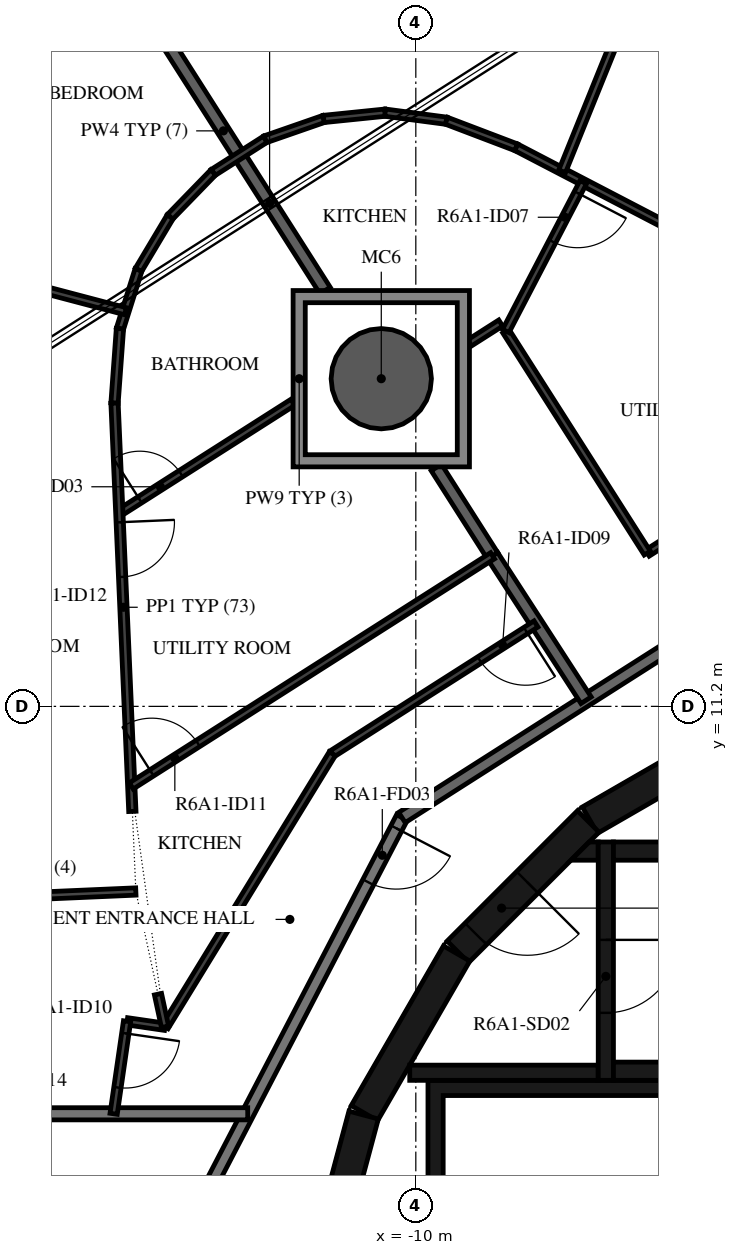
"""IFC4 building model, lengths in metres.
Left out: names, types, materials, properties, quantities, classifications, styles, units other than length and angle.
Written with IfcOpenShell. Run it as: python <this file> out.ifc"""

import sys

from ifc_helpers import new_model, si_unit, direction, frame, frame_2d, origin, origin_2d, place, context, subcontext, project, spatial, polyline, rectangle, hollow_circle, outline, extrude, element, fill, save


model = new_model("IFC4")
c1 = context("Model", 3, precision=1e-05, world=origin(), true_north=direction((0.0, 1.0)))
c2 = subcontext(c1, "Body", "Model", "MODEL_VIEW")
j1 = project(units=[si_unit("LENGTHUNIT", "METRE"), si_unit("PLANEANGLEUNIT", "RADIAN")], contexts=[c1])
p1 = place(None, origin())
s1 = spatial("IfcSite", under=j1, at=p1, CompositionType="ELEMENT")
p2 = place(p1, origin())
s2 = spatial("IfcBuilding", under=s1, at=p2, CompositionType="ELEMENT")
p3 = place(p2, frame((0.0, 0.0, 230.2)))
s3 = spatial("IfcBuildingStorey", under=s2, at=p3, CompositionType="ELEMENT", Elevation=230.2)
p4 = place(p3, frame((-10.568, 16.588, -0.38), z_axis=(0.0, 0.0, 1.0), x_axis=(1.0, 0.0, 0.0)))
e1 = element("IfcColumn", 1, at=p4, inside=s3, PredefinedType="COLUMN", context=c2, shape_type="SweptSolid", body=[
    extrude(hollow_circle(Radius=0.825, WallThickness=0.04, at=origin_2d()), origin(), (0.0, 0.0, 1.0), 3.5),
])
p5 = place(p3, frame((-4.51, 10.845, 0.0), z_axis=(0.0, 0.0, 1.0), x_axis=(-0.865975092491, -0.500087131594, 0.0)))
e2 = element("IfcWall", 2, at=p5, inside=s3, PredefinedType="SHEAR", context=c2, shape_type="SweptSolid", body=[
    extrude(rectangle(XDim=3.033, YDim=0.5, at=frame_2d((1.516, 0.0))), origin(), (0.0, 0.0, 1.0), 3.12),
])
p6 = place(p3, frame((-7.164, 9.308, 0.0), z_axis=(0.0, 0.0, 1.0), x_axis=(-0.707106781187, -0.707106781187, 0.0)))
e3 = element("IfcWall", 3, at=p6, inside=s3, PredefinedType="SHEAR", context=c2, shape_type="SweptSolid", body=[
    extrude(rectangle(XDim=3.032, YDim=0.5, at=frame_2d((1.516, 0.0))), origin(), (0.0, 0.0, 1.0), 3.12),
])
p7 = place(p6, frame((1.416, 0.0, 0.0)))
e4 = element("IfcOpeningElement", 4, at=p7, cuts=e3, PredefinedType="OPENING", context=c2, shape_type="SweptSolid", body=[
    extrude(rectangle(XDim=1.2, YDim=2.1, at=frame_2d((0.6, 1.05))), frame((0.0, 0.26, 0.0), z_axis=(0.0, -1.0, 0.0), x_axis=(1.0, 0.0, 0.0)), (0.0, 0.0, 1.0), 0.52),
])
for number, where, z_axis, x_axis in (
    (5, (-9.329, 7.137, 0.0), (0.0, 0.0, 1.0), (-0.5, -0.866, 0.0)),
    (6, (-10.858, 4.479, 0.0), (0.0, 0.0, 1.0), (-0.259, -0.966, 0.0)),
):
    element("IfcWall", number, at=place(p3, frame(where, z_axis=z_axis, x_axis=x_axis)), inside=s3, PredefinedType="SHEAR", context=c2, shape_type="SweptSolid", body=[
        extrude(rectangle(XDim=3.033, YDim=0.5, at=frame_2d((1.516, 0.0))), origin(), (0.0, 0.0, 1.0), 3.12),
    ])
for number, where, z_axis, x_axis in (
    (7, (-6.75, 5.2, 0.0), (0.0, 0.0, 1.0), (1.0, 0.0, 0.0)),
    (8, (-6.75, 8.82, 0.0), (0.0, 0.0, 1.0), (1.0, 0.0, 0.0)),
):
    element("IfcWall", number, at=place(p3, frame(where, z_axis=z_axis, x_axis=x_axis)), inside=s3, PredefinedType="SHEAR", context=c2, shape_type="SweptSolid", body=[
        extrude(rectangle(XDim=6.75, YDim=0.3, at=frame_2d((3.375, 0.0))), origin(), (0.0, 0.0, 1.0), 3.12),
    ])
p8 = place(p3, frame((-6.875, 8.97, 0.0), z_axis=(0.0, 0.0, 1.0), x_axis=(0.0, -1.0, 0.0)))
e9 = element("IfcWall", 9, at=p8, inside=s3, PredefinedType="SHEAR", context=c2, shape_type="SweptSolid", body=[
    extrude(rectangle(XDim=3.92, YDim=0.25, at=frame_2d((1.96, 0.0))), origin(), (0.0, 0.0, 1.0), 3.12),
])
p9 = place(p8, frame((1.61, 0.0, 0.0)))
e10 = element("IfcOpeningElement", 10, at=p9, cuts=e9, PredefinedType="OPENING", context=c2, shape_type="SweptSolid", body=[
    extrude(rectangle(XDim=1.2, YDim=2.1, at=frame_2d((0.6, 1.05))), frame((0.0, 0.135, 0.0), z_axis=(0.0, -1.0, 0.0), x_axis=(1.0, 0.0, 0.0)), (0.0, 0.0, 1.0), 0.27),
])
p10 = place(p3, frame((-7.0, 5.175, 0.0), z_axis=(0.0, 0.0, 1.0), x_axis=(-1.0, 0.0, 0.0)))
e11 = element("IfcWall", 11, at=p10, inside=s3, PredefinedType="SHEAR", context=c2, shape_type="SweptSolid", body=[
    extrude(rectangle(XDim=3.1, YDim=0.25, at=frame_2d((1.55, 0.0))), origin(), (0.0, 0.0, 1.0), 3.12),
])
p11 = place(p3, origin())
e12 = element("IfcWall", 12, at=p11, inside=s3, PredefinedType="SHEAR", context=c2, shape_type="SweptSolid", body=[
    extrude(outline(polyline([(-7.148, 8.97), (-7.0, 8.97), (-7.0, 8.67), (-7.448, 8.67), (-7.148, 8.97)])), origin(), (0.0, 0.0, 1.0), 3.12),
])
p12 = place(p3, origin())
e13 = element("IfcWall", 13, at=p12, inside=s3, PredefinedType="SHEAR", context=c2, shape_type="SweptSolid", body=[
    extrude(outline(polyline([(-9.55, 4.8), (-5.5, 4.8), (-5.5, 1.9), (-5.25, 1.9), (-5.25, 4.8), (-1.2, 4.8), (-1.2, 1.9), (-0.95, 1.9), (-0.95, 4.8), (0.95, 4.8), (0.95, 1.9), (1.2, 1.9), (1.2, 4.8), (3.1, 4.8), (3.1, 1.9), (3.35, 1.9), (3.35, 4.8), (5.25, 4.8), (5.25, 1.9), (5.5, 1.9), (5.5, 4.8), (7.4, 4.8), (7.4, 1.9), (7.65, 1.9), (7.65, 4.8), (9.55, 4.8), (9.55, 1.9), (9.8, 1.9), (9.8, 4.8), (9.8, 5.05), (-9.8, 5.05), (-9.8, 4.8), (-9.8, 1.9), (-9.55, 1.9), (-9.55, 4.8)])), origin(), (0.0, 0.0, 1.0), 3.12),
])
p13 = place(p3, frame((-10.228, 9.372, 0.0), z_axis=(0.0, 0.0, 1.0), x_axis=(-0.461759464021, -0.887005184532, 0.0)))
e14 = element("IfcWall", 14, at=p13, inside=s3, PredefinedType="STANDARD", context=c2, shape_type="SweptSolid", body=[
    extrude(rectangle(XDim=7.181, YDim=0.2, at=frame_2d((3.591, 0.0))), origin(), (0.0, 0.0, 1.0), 3.12),
])
p14 = place(p13, frame((0.2, 0.0, 0.0)))
e15 = element("IfcOpeningElement", 15, at=p14, cuts=e14, PredefinedType="OPENING", context=c2, shape_type="SweptSolid", body=[
    extrude(rectangle(XDim=1.0, YDim=2.1, at=frame_2d((0.5, 1.05))), frame((0.0, 0.11, 0.0), z_axis=(0.0, -1.0, 0.0), x_axis=(1.0, 0.0, 0.0)), (0.0, 0.0, 1.0), 0.22),
])
p15 = place(p3, frame((-4.172, 13.231, 0.0), z_axis=(0.0, 0.0, 1.0), x_axis=(-0.843388394728, -0.537304397561, 0.0)))
e16 = element("IfcWall", 16, at=p15, inside=s3, PredefinedType="STANDARD", context=c2, shape_type="SweptSolid", body=[
    extrude(rectangle(XDim=7.181, YDim=0.2, at=frame_2d((3.59, 0.0))), origin(), (0.0, 0.0, 1.0), 3.12),
])
p16 = place(p3, frame((-12.764, 4.5, 0.0), z_axis=(0.0, 0.0, 1.0), x_axis=(-1.0, 0.0, 0.0)))
e17 = element("IfcWall", 17, at=p16, inside=s3, PredefinedType="STANDARD", context=c2, shape_type="SweptSolid", body=[
    extrude(rectangle(XDim=4.086, YDim=0.2, at=frame_2d((2.043, 0.0))), origin(), (0.0, 0.0, 1.0), 3.12),
])
p17 = place(p3, frame((-8.738, 13.677, 0.0), z_axis=(0.0, 0.0, 1.0), x_axis=(0.54358037296, -0.839357121929, 0.0)))
e18 = element("IfcWall", 18, at=p17, inside=s3, PredefinedType="STANDARD", context=c2, shape_type="SweptSolid", body=[
    extrude(rectangle(XDim=2.83, YDim=0.2, at=frame_2d((1.415, 0.0))), origin(), (0.0, 0.0, 1.0), 3.12),
])
p18 = place(p3, frame((-9.663, 15.129, 0.0), z_axis=(0.0, 0.0, 1.0), x_axis=(0.537205715853, -0.843451254581, 0.0)))
e19 = element("IfcWall", 19, at=p18, inside=s3, PredefinedType="STANDARD", context=c2, shape_type="SweptSolid", body=[
    extrude(rectangle(XDim=1.722, YDim=0.2, at=frame_2d((0.861, 0.0))), origin(), (0.0, 0.0, 1.0), 3.12),
])
p19 = place(p3, frame((-14.837, 23.29, 0.0), z_axis=(0.0, 0.0, 1.0), x_axis=(0.537316863221, -0.843380452998, 0.0)))
e20 = element("IfcWall", 20, at=p19, inside=s3, PredefinedType="STANDARD", context=c2, shape_type="SweptSolid", body=[
    extrude(rectangle(XDim=6.227, YDim=0.2, at=frame_2d((3.113, 0.0))), origin(), (0.0, 0.0, 1.0), 3.12),
])
p20 = place(p3, frame((-4.639, 14.712, 0.0), z_axis=(0.0, 0.0, 1.0), x_axis=(-0.843361471414, -0.537346655833, 0.0)))
e21 = element("IfcWall", 21, at=p20, inside=s3, PredefinedType="PARTITIONING", context=c2, shape_type="SweptSolid", body=[
    extrude(rectangle(XDim=1.844, YDim=0.12, at=frame_2d((0.922, 0.0))), origin(), (0.0, 0.0, 1.0), 3.12),
])
p21 = place(p20, frame((0.2, 0.0, 0.0)))
e22 = element("IfcOpeningElement", 22, at=p21, cuts=e21, PredefinedType="OPENING", context=c2, shape_type="SweptSolid", body=[
    extrude(rectangle(XDim=0.9, YDim=2.1, at=frame_2d((0.45, 1.05))), frame((0.0, 0.07, 0.0), z_axis=(0.0, -1.0, 0.0), x_axis=(1.0, 0.0, 0.0)), (0.0, 0.0, 1.0), 0.14),
])
p22 = place(p3, frame((-6.194, 13.721, 0.0), z_axis=(0.0, 0.0, 1.0), x_axis=(-0.537316807294, 0.843380488629, 0.0)))
e23 = element("IfcWall", 23, at=p22, inside=s3, PredefinedType="PARTITIONING", context=c2, shape_type="SweptSolid", body=[
    extrude(rectangle(XDim=4.331, YDim=0.12, at=frame_2d((2.165, 0.0))), origin(), (0.0, 0.0, 1.0), 3.12),
])
p23 = place(p3, frame((-8.604, 17.504, 0.0), z_axis=(0.0, 0.0, 1.0), x_axis=(-0.843265746233, -0.537496866251, 0.0)))
e24 = element("IfcWall", 24, at=p23, inside=s3, PredefinedType="PARTITIONING", context=c2, shape_type="SweptSolid", body=[
    extrude(rectangle(XDim=0.61, YDim=0.12, at=frame_2d((0.305, 0.0))), origin(), (0.0, 0.0, 1.0), 3.12),
])
p24 = place(p3, frame((-8.35, 20.394, 0.0), z_axis=(0.0, 0.0, 1.0), x_axis=(0.887020940825, -0.461729196107, 0.0)))
e25 = element("IfcWall", 25, at=p24, inside=s3, PredefinedType="PARTITIONING", context=c2, shape_type="SweptSolid", body=[
    extrude(rectangle(XDim=11.678, YDim=0.12, at=frame_2d((5.839, 0.0))), origin(), (0.0, 0.0, 1.0), 3.12),
])
p25 = place(p3, frame((-6.237, 23.353, 0.0), z_axis=(0.0, 0.0, 1.0), x_axis=(-0.375089171101, -0.92698873441, 0.0)))
e26 = element("IfcWall", 26, at=p25, inside=s3, PredefinedType="PARTITIONING", context=c2, shape_type="SweptSolid", body=[
    extrude(rectangle(XDim=3.616, YDim=0.12, at=frame_2d((1.808, 0.0))), origin(), (0.0, 0.0, 1.0), 2.73),
])
p26 = place(p25, frame((0.2, 0.0, 0.0)))
e27 = element("IfcOpeningElement", 27, at=p26, cuts=e26, PredefinedType="OPENING", context=c2, shape_type="SweptSolid", body=[
    extrude(rectangle(XDim=0.9, YDim=2.1, at=frame_2d((0.45, 1.05))), frame((0.0, 0.07, 0.0), z_axis=(0.0, -1.0, 0.0), x_axis=(1.0, 0.0, 0.0)), (0.0, 0.0, 1.0), 0.14),
])
p27 = place(p3, frame((-7.247, 19.82, 0.0), z_axis=(0.0, 0.0, 1.0), x_axis=(-0.46174004932, -0.887015291218, 0.0)))
e28 = element("IfcWall", 28, at=p27, inside=s3, PredefinedType="PARTITIONING", context=c2, shape_type="SweptSolid", body=[
    extrude(rectangle(XDim=2.759, YDim=0.12, at=frame_2d((1.379, 0.0))), origin(), (0.0, 0.0, 1.0), 3.12),
])
p28 = place(p27, frame((0.2, 0.0, 0.0)))
e29 = element("IfcOpeningElement", 29, at=p28, cuts=e28, PredefinedType="OPENING", context=c2, shape_type="SweptSolid", body=[
    extrude(rectangle(XDim=0.9, YDim=2.1, at=frame_2d((0.45, 1.05))), frame((0.0, 0.07, 0.0), z_axis=(0.0, -1.0, 0.0), x_axis=(1.0, 0.0, 0.0)), (0.0, 0.0, 1.0), 0.14),
])
for number, where, z_axis, x_axis in (
    (30, (-13.332, 19.981, 0.0), (0.0, 0.0, 1.0), (0.843, 0.537, 0.0)),
    (31, (-12.475, 20.527, 0.0), (0.0, 0.0, 1.0), (0.945, 0.328, 0.0)),
):
    element("IfcWall", number, at=place(p3, frame(where, z_axis=z_axis, x_axis=x_axis)), inside=s3, PredefinedType="PARTITIONING", context=c2, shape_type="SweptSolid", body=[
        extrude(rectangle(XDim=1.016, YDim=0.12, at=frame_2d((0.508, 0.0))), origin(), (0.0, 0.0, 1.0), 3.12),
    ])
p29 = place(p3, frame((-11.515, 20.86, 0.0), z_axis=(0.0, 0.0, 1.0), x_axis=(0.994818278641, 0.101669034034, 0.0)))
e32 = element("IfcWall", 32, at=p29, inside=s3, PredefinedType="PARTITIONING", context=c2, shape_type="SweptSolid", body=[
    extrude(rectangle(XDim=1.016, YDim=0.12, at=frame_2d((0.508, 0.0))), origin(), (0.0, 0.0, 1.0), 3.12),
])
p30 = place(p3, frame((-10.504, 20.963, 0.0), z_axis=(0.0, 0.0, 1.0), x_axis=(0.991451023706, -0.13047937612, 0.0)))
e33 = element("IfcWall", 33, at=p30, inside=s3, PredefinedType="PARTITIONING", context=c2, shape_type="SweptSolid", body=[
    extrude(rectangle(XDim=1.016, YDim=0.12, at=frame_2d((0.508, 0.0))), origin(), (0.0, 0.0, 1.0), 3.12),
])
p31 = place(p3, frame((-9.497, 20.831, 0.0), z_axis=(0.0, 0.0, 1.0), x_axis=(0.934575963521, -0.355763641213, 0.0)))
e34 = element("IfcWall", 34, at=p31, inside=s3, PredefinedType="PARTITIONING", context=c2, shape_type="SweptSolid", body=[
    extrude(rectangle(XDim=1.227, YDim=0.12, at=frame_2d((0.614, 0.0))), origin(), (0.0, 0.0, 1.0), 3.12),
])
p32 = place(p3, frame((-8.023, 12.555, 0.0), z_axis=(0.0, 0.0, 1.0), x_axis=(-0.843408270233, -0.537273198385, 0.0)))
e35 = element("IfcWall", 35, at=p32, inside=s3, PredefinedType="PARTITIONING", context=c2, shape_type="SweptSolid", body=[
    extrude(rectangle(XDim=3.971, YDim=0.12, at=frame_2d((1.986, 0.0))), origin(), (0.0, 0.0, 1.0), 3.12),
])
p33 = place(p32, frame((0.2, 0.0, 0.0)))
e36 = element("IfcOpeningElement", 36, at=p33, cuts=e35, PredefinedType="OPENING", context=c2, shape_type="SweptSolid", body=[
    extrude(rectangle(XDim=0.9, YDim=2.1, at=frame_2d((0.45, 1.05))), frame((0.0, 0.07, 0.0), z_axis=(0.0, -1.0, 0.0), x_axis=(1.0, 0.0, 0.0)), (0.0, 0.0, 1.0), 0.14),
])
p34 = place(p3, frame((-11.373, 10.421, 0.0), z_axis=(0.0, 0.0, 1.0), x_axis=(-0.522435957358, -0.852678527031, 0.0)))
e37 = element("IfcWall", 37, at=p34, inside=s3, PredefinedType="PARTITIONING", context=c2, shape_type="SweptSolid", body=[
    extrude(rectangle(XDim=5.267, YDim=0.12, at=frame_2d((2.633, 0.0))), origin(), (0.0, 0.0, 1.0), 3.12),
])
p35 = place(p3, frame((-14.125, 5.931, 0.0), z_axis=(0.0, 0.0, 1.0), x_axis=(-0.989621518838, 0.143698467119, 0.0)))
e38 = element("IfcWall", 38, at=p35, inside=s3, PredefinedType="PARTITIONING", context=c2, shape_type="SweptSolid", body=[
    extrude(rectangle(XDim=0.63, YDim=0.12, at=frame_2d((0.315, 0.0))), origin(), (0.0, 0.0, 1.0), 3.12),
])
p36 = place(p3, frame((-14.748, 6.021, 0.0), z_axis=(0.0, 0.0, 1.0), x_axis=(-0.143888945672, -0.98959384159, 0.0)))
e39 = element("IfcWall", 39, at=p36, inside=s3, PredefinedType="PARTITIONING", context=c2, shape_type="SweptSolid", body=[
    extrude(rectangle(XDim=1.537, YDim=0.12, at=frame_2d((0.769, 0.0))), origin(), (0.0, 0.0, 1.0), 3.12),
])
p37 = place(p36, frame((0.2, 0.0, 0.0)))
e40 = element("IfcOpeningElement", 40, at=p37, cuts=e39, PredefinedType="OPENING", context=c2, shape_type="SweptSolid", body=[
    extrude(rectangle(XDim=0.9, YDim=2.1, at=frame_2d((0.45, 1.05))), frame((0.0, 0.07, 0.0), z_axis=(0.0, -1.0, 0.0), x_axis=(1.0, 0.0, 0.0)), (0.0, 0.0, 1.0), 0.14),
])
for number, where, z_axis, x_axis in (
    (41, (-14.865, 17.411, 0.0), (0.0, 0.0, 1.0), (0.301, 0.954, 0.0)),
    (42, (-14.56, 18.38, 0.0), (0.0, 0.0, 1.0), (0.513, 0.859, 0.0)),
    (43, (-14.039, 19.252, 0.0), (0.0, 0.0, 1.0), (0.697, 0.717, 0.0)),
):
    element("IfcWall", number, at=place(p3, frame(where, z_axis=z_axis, x_axis=x_axis)), inside=s3, PredefinedType="PARTITIONING", context=c2, shape_type="SweptSolid", body=[
        extrude(rectangle(XDim=1.016, YDim=0.12, at=frame_2d((0.508, 0.0))), origin(), (0.0, 0.0, 1.0), 3.12),
    ])
p38 = place(p3, frame((-18.26, 18.618, 0.0), z_axis=(0.0, 0.0, 1.0), x_axis=(0.96689176932, -0.25518680691, 0.0)))
e44 = element("IfcWall", 44, at=p38, inside=s3, PredefinedType="PARTITIONING", context=c2, shape_type="SweptSolid", body=[
    extrude(rectangle(XDim=3.604, YDim=0.12, at=frame_2d((1.802, 0.0))), origin(), (0.0, 0.0, 1.0), 3.12),
])
p39 = place(p38, frame((0.2, 0.0, 0.0)))
e45 = element("IfcOpeningElement", 45, at=p39, cuts=e44, PredefinedType="OPENING", context=c2, shape_type="SweptSolid", body=[
    extrude(rectangle(XDim=0.9, YDim=2.1, at=frame_2d((0.45, 1.05))), frame((0.0, 0.07, 0.0), z_axis=(0.0, -1.0, 0.0), x_axis=(1.0, 0.0, 0.0)), (0.0, 0.0, 1.0), 0.14),
])
p40 = place(p3, frame((-14.876, 14.382, 0.0), z_axis=(0.0, 0.0, 1.0), x_axis=(0.843409222082, 0.537271704175, 0.0)))
e46 = element("IfcWall", 46, at=p40, inside=s3, PredefinedType="PARTITIONING", context=c2, shape_type="SweptSolid", body=[
    extrude(rectangle(XDim=3.388, YDim=0.12, at=frame_2d((1.694, 0.0))), origin(), (0.0, 0.0, 1.0), 3.12),
])
p41 = place(p40, frame((0.4, 0.0, 0.0)))
e47 = element("IfcOpeningElement", 47, at=p41, cuts=e46, PredefinedType="OPENING", context=c2, shape_type="SweptSolid", body=[
    extrude(rectangle(XDim=0.8, YDim=2.1, at=frame_2d((0.4, 1.05))), frame((0.0, 0.07, 0.0), z_axis=(0.0, -1.0, 0.0), x_axis=(1.0, 0.0, 0.0)), (0.0, 0.0, 1.0), 0.14),
])
p42 = place(p3, frame((-14.865, 17.411, 0.0), z_axis=(0.0, 0.0, 1.0), x_axis=(-0.072618457011, -0.997359794508, 0.0)))
e48 = element("IfcWall", 48, at=p42, inside=s3, PredefinedType="PARTITIONING", context=c2, shape_type="SweptSolid", body=[
    extrude(rectangle(XDim=1.227, YDim=0.12, at=frame_2d((0.614, 0.0))), origin(), (0.0, 0.0, 1.0), 3.12),
])
p43 = place(p3, frame((-14.955, 16.187, 0.0), z_axis=(0.0, 0.0, 1.0), x_axis=(0.043591713888, -0.999049429448, 0.0)))
e49 = element("IfcWall", 49, at=p43, inside=s3, PredefinedType="PARTITIONING", context=c2, shape_type="SweptSolid", body=[
    extrude(rectangle(XDim=6.721, YDim=0.12, at=frame_2d((3.36, 0.0))), origin(), (0.0, 0.0, 1.0), 3.12),
])
p44 = place(p43, frame((1.961, 0.0, 0.0)))
e50 = element("IfcOpeningElement", 50, at=p44, cuts=e49, PredefinedType="OPENING", context=c2, shape_type="SweptSolid", body=[
    extrude(rectangle(XDim=0.9, YDim=2.1, at=frame_2d((0.45, 1.05))), frame((0.0, 0.07, 0.0), z_axis=(0.0, -1.0, 0.0), x_axis=(1.0, 0.0, 0.0)), (0.0, 0.0, 1.0), 0.14),
])
p45 = place(p3, frame((-14.68, 9.891, 0.0), z_axis=(0.0, 0.0, 1.0), x_axis=(0.843391697183, 0.537299213774, 0.0)))
e51 = element("IfcWall", 51, at=p45, inside=s3, PredefinedType="PARTITIONING", context=c2, shape_type="SweptSolid", body=[
    extrude(rectangle(XDim=7.045, YDim=0.12, at=frame_2d((3.522, 0.0))), origin(), (0.0, 0.0, 1.0), 3.12),
])
p46 = place(p45, frame((0.4, 0.0, 0.0)))
e52 = element("IfcOpeningElement", 52, at=p46, cuts=e51, PredefinedType="OPENING", context=c2, shape_type="SweptSolid", body=[
    extrude(rectangle(XDim=0.9, YDim=2.1, at=frame_2d((0.45, 1.05))), frame((0.0, 0.07, 0.0), z_axis=(0.0, -1.0, 0.0), x_axis=(1.0, 0.0, 0.0)), (0.0, 0.0, 1.0), 0.14),
])
p47 = place(p3, frame((-14.24, 6.467, 0.0), z_axis=(0.0, 0.0, 1.0), x_axis=(0.210896225868, -0.977508456186, 0.0)))
e53 = element("IfcWall", 53, at=p47, inside=s3, PredefinedType="PARTITIONING", context=c2, shape_type="SweptSolid", body=[
    extrude(rectangle(XDim=0.549, YDim=0.12, at=frame_2d((0.274, 0.0))), origin(), (0.0, 0.0, 1.0), 3.12),
])
p48 = place(p3, frame((-18.201, 7.999, 0.0), z_axis=(0.0, 0.0, 1.0), x_axis=(0.999048850974, 0.043604969534, 0.0)))
e54 = element("IfcWall", 54, at=p48, inside=s3, PredefinedType="PARTITIONING", context=c2, shape_type="SweptSolid", body=[
    extrude(rectangle(XDim=3.6, YDim=0.12, at=frame_2d((1.8, 0.0))), origin(), (0.0, 0.0, 1.0), 2.73),
])
p49 = place(p3, origin())
e55 = element("IfcWall", 55, at=p49, inside=s3, PredefinedType="STANDARD", context=c2, shape_type="SweptSolid", body=[
    extrude(outline(polyline([(-9.118, 18.038), (-9.118, 15.138), (-12.018, 15.138), (-12.018, 18.038), (-9.118, 18.038)]), holes=[polyline([(-11.818, 15.338), (-9.318, 15.338), (-9.318, 17.838), (-11.818, 17.838), (-11.818, 15.338)])]), origin(), (0.0, 0.0, 1.0), 3.12),
])
p50 = place(p9, origin())
e56 = element("IfcDoor", 56, at=p50, inside=s3, OperationType="SINGLE_SWING_LEFT", PredefinedType="DOOR", context=c2, shape_type="SweptSolid", body=[
    extrude(rectangle(XDim=1.2, YDim=2.1, at=frame_2d((0.6, 1.05))), frame((0.0, 0.025, 0.0), z_axis=(0.0, -1.0, 0.0), x_axis=(1.0, 0.0, 0.0)), (0.0, 0.0, 1.0), 0.05),
])
fill(e10, e56)
p51 = place(p7, origin())
e57 = element("IfcDoor", 57, at=p51, inside=s3, OperationType="SINGLE_SWING_RIGHT", PredefinedType="DOOR", context=c2, shape_type="SweptSolid", body=[
    extrude(rectangle(XDim=1.2, YDim=2.1, at=frame_2d((0.6, 1.05))), frame((0.0, 0.025, 0.0), z_axis=(0.0, -1.0, 0.0), x_axis=(1.0, 0.0, 0.0)), (0.0, 0.0, 1.0), 0.05),
])
fill(e4, e57)
p52 = place(p28, origin())
e58 = element("IfcDoor", 58, at=p52, inside=s3, OperationType="SINGLE_SWING_RIGHT", PredefinedType="DOOR", context=c2, shape_type="SweptSolid", body=[
    extrude(rectangle(XDim=0.9, YDim=2.1, at=frame_2d((0.45, 1.05))), frame((0.0, 0.025, 0.0), z_axis=(0.0, -1.0, 0.0), x_axis=(1.0, 0.0, 0.0)), (0.0, 0.0, 1.0), 0.05),
])
fill(e29, e58)
p53 = place(p14, origin())
e59 = element("IfcDoor", 59, at=p53, inside=s3, OperationType="SINGLE_SWING_LEFT", PredefinedType="DOOR", context=c2, shape_type="SweptSolid", body=[
    extrude(rectangle(XDim=1.0, YDim=2.1, at=frame_2d((0.5, 1.05))), frame((0.0, 0.025, 0.0), z_axis=(0.0, -1.0, 0.0), x_axis=(1.0, 0.0, 0.0)), (0.0, 0.0, 1.0), 0.05),
])
fill(e15, e59)
p54 = place(p33, origin())
e60 = element("IfcDoor", 60, at=p54, inside=s3, OperationType="SINGLE_SWING_LEFT", PredefinedType="DOOR", context=c2, shape_type="SweptSolid", body=[
    extrude(rectangle(XDim=0.9, YDim=2.1, at=frame_2d((0.45, 1.05))), frame((0.0, 0.025, 0.0), z_axis=(0.0, -1.0, 0.0), x_axis=(1.0, 0.0, 0.0)), (0.0, 0.0, 1.0), 0.05),
])
fill(e36, e60)
p55 = place(p37, origin())
e61 = element("IfcDoor", 61, at=p55, inside=s3, OperationType="SINGLE_SWING_LEFT", PredefinedType="DOOR", context=c2, shape_type="SweptSolid", body=[
    extrude(rectangle(XDim=0.9, YDim=2.1, at=frame_2d((0.45, 1.05))), frame((0.0, 0.025, 0.0), z_axis=(0.0, -1.0, 0.0), x_axis=(1.0, 0.0, 0.0)), (0.0, 0.0, 1.0), 0.05),
])
fill(e40, e61)
p56 = place(p46, origin())
e62 = element("IfcDoor", 62, at=p56, inside=s3, OperationType="SINGLE_SWING_LEFT", PredefinedType="DOOR", context=c2, shape_type="SweptSolid", body=[
    extrude(rectangle(XDim=0.9, YDim=2.1, at=frame_2d((0.45, 1.05))), frame((0.0, 0.025, 0.0), z_axis=(0.0, -1.0, 0.0), x_axis=(1.0, 0.0, 0.0)), (0.0, 0.0, 1.0), 0.05),
])
fill(e52, e62)
p57 = place(p41, origin())
e63 = element("IfcDoor", 63, at=p57, inside=s3, OperationType="SINGLE_SWING_LEFT", PredefinedType="DOOR", context=c2, shape_type="SweptSolid", body=[
    extrude(rectangle(XDim=0.8, YDim=2.1, at=frame_2d((0.4, 1.05))), frame((0.0, 0.025, 0.0), z_axis=(0.0, -1.0, 0.0), x_axis=(1.0, 0.0, 0.0)), (0.0, 0.0, 1.0), 0.05),
])
fill(e47, e63)
p58 = place(p44, origin())
e64 = element("IfcDoor", 64, at=p58, inside=s3, OperationType="SINGLE_SWING_LEFT", PredefinedType="DOOR", context=c2, shape_type="SweptSolid", body=[
    extrude(rectangle(XDim=0.9, YDim=2.1, at=frame_2d((0.45, 1.05))), frame((0.0, 0.025, 0.0), z_axis=(0.0, -1.0, 0.0), x_axis=(1.0, 0.0, 0.0)), (0.0, 0.0, 1.0), 0.05),
])
fill(e50, e64)
save(model, sys.argv[1])
